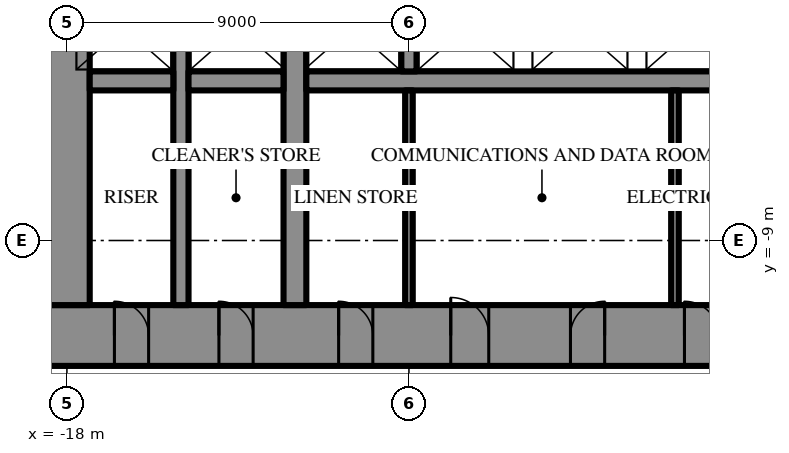
"""IFC4 building model, lengths in metres.
Left out: names, types, materials, properties, quantities, classifications, styles, units other than length and angle.
Written with IfcOpenShell. Run it as: python <this file> out.ifc"""

import sys

from ifc_helpers import new_model, si_unit, direction, frame, frame_2d, origin, place, context, subcontext, project, spatial, rectangle, extrude, element, fill, save


model = new_model("IFC4")
c1 = context("Model", 3, precision=1e-05, world=origin(), true_north=direction((0.0, 1.0)))
c2 = subcontext(c1, "Body", "Model", "MODEL_VIEW")
j1 = project(units=[si_unit("LENGTHUNIT", "METRE"), si_unit("PLANEANGLEUNIT", "RADIAN")], contexts=[c1])
p1 = place(None, origin())
s1 = spatial("IfcSite", under=j1, at=p1, CompositionType="ELEMENT")
p2 = place(p1, origin())
s2 = spatial("IfcBuilding", under=s1, at=p2, CompositionType="ELEMENT")
p3 = place(p2, frame((0.0, 0.0, 78.1)))
s3 = spatial("IfcBuildingStorey", under=s2, at=p3, CompositionType="ELEMENT", Elevation=78.1)
p4 = place(p3, frame((18.6, -11.5, 0.0), z_axis=(0.0, 0.0, 1.0), x_axis=(-1.0, 0.0, 0.0)))
e1 = element("IfcWall", 1, at=p4, inside=s3, PredefinedType="SHEAR", context=c2, shape_type="SweptSolid", body=[
    extrude(rectangle(XDim=37.2, YDim=1.6, at=frame_2d((18.6, 0.0))), origin(), (0.0, 0.0, 1.0), 4.2),
])
p5 = place(p4, frame((19.45, 0.0, 0.0)))
e2 = element("IfcOpeningElement", 2, at=p5, cuts=e1, PredefinedType="OPENING", context=c2, shape_type="SweptSolid", body=[
    extrude(rectangle(XDim=0.9, YDim=2.2, at=frame_2d((0.45, 1.1))), frame((0.0, 0.81, 0.0), z_axis=(0.0, -1.0, 0.0), x_axis=(1.0, 0.0, 0.0)), (0.0, 0.0, 1.0), 1.62),
])
p6 = place(p4, frame((22.45, 0.0, 0.0)))
e3 = element("IfcOpeningElement", 3, at=p6, cuts=e1, PredefinedType="OPENING", context=c2, shape_type="SweptSolid", body=[
    extrude(rectangle(XDim=0.9, YDim=2.2, at=frame_2d((0.45, 1.1))), frame((0.0, 0.81, 0.0), z_axis=(0.0, -1.0, 0.0), x_axis=(1.0, 0.0, 0.0)), (0.0, 0.0, 1.0), 1.62),
])
p7 = place(p4, frame((25.5, 0.0, 0.0)))
e4 = element("IfcOpeningElement", 4, at=p7, cuts=e1, PredefinedType="OPENING", context=c2, shape_type="SweptSolid", body=[
    extrude(rectangle(XDim=1.0, YDim=2.2, at=frame_2d((0.5, 1.1))), frame((0.0, 0.81, 0.0), z_axis=(0.0, -1.0, 0.0), x_axis=(1.0, 0.0, 0.0)), (0.0, 0.0, 1.0), 1.62),
])
p8 = place(p4, frame((1.85, 0.0, 0.0)))
e5 = element("IfcOpeningElement", 5, at=p8, cuts=e1, PredefinedType="OPENING", context=c2, shape_type="SweptSolid", body=[
    extrude(rectangle(XDim=0.9, YDim=2.2, at=frame_2d((0.45, 1.1))), frame((0.0, 0.81, 0.0), z_axis=(0.0, -1.0, 0.0), x_axis=(1.0, 0.0, 0.0)), (0.0, 0.0, 1.0), 1.62),
])
p9 = place(p4, frame((4.6, 0.0, 0.0)))
e6 = element("IfcOpeningElement", 6, at=p9, cuts=e1, PredefinedType="OPENING", context=c2, shape_type="SweptSolid", body=[
    extrude(rectangle(XDim=0.9, YDim=2.2, at=frame_2d((0.45, 1.1))), frame((0.0, 0.81, 0.0), z_axis=(0.0, -1.0, 0.0), x_axis=(1.0, 0.0, 0.0)), (0.0, 0.0, 1.0), 1.62),
])
p10 = place(p4, frame((7.75, 0.0, 0.0)))
e7 = element("IfcOpeningElement", 7, at=p10, cuts=e1, PredefinedType="OPENING", context=c2, shape_type="SweptSolid", body=[
    extrude(rectangle(XDim=0.9, YDim=2.2, at=frame_2d((0.45, 1.1))), frame((0.0, 0.81, 0.0), z_axis=(0.0, -1.0, 0.0), x_axis=(1.0, 0.0, 0.0)), (0.0, 0.0, 1.0), 1.62),
])
p11 = place(p4, frame((28.55, 0.0, 0.0)))
e8 = element("IfcOpeningElement", 8, at=p11, cuts=e1, PredefinedType="OPENING", context=c2, shape_type="SweptSolid", body=[
    extrude(rectangle(XDim=0.9, YDim=2.2, at=frame_2d((0.45, 1.1))), frame((0.0, 0.81, 0.0), z_axis=(0.0, -1.0, 0.0), x_axis=(1.0, 0.0, 0.0)), (0.0, 0.0, 1.0), 1.62),
])
p12 = place(p4, frame((31.7, 0.0, 0.0)))
e9 = element("IfcOpeningElement", 9, at=p12, cuts=e1, PredefinedType="OPENING", context=c2, shape_type="SweptSolid", body=[
    extrude(rectangle(XDim=0.9, YDim=2.2, at=frame_2d((0.45, 1.1))), frame((0.0, 0.81, 0.0), z_axis=(0.0, -1.0, 0.0), x_axis=(1.0, 0.0, 0.0)), (0.0, 0.0, 1.0), 1.62),
])
p13 = place(p4, frame((34.45, 0.0, 0.0)))
e10 = element("IfcOpeningElement", 10, at=p13, cuts=e1, PredefinedType="OPENING", context=c2, shape_type="SweptSolid", body=[
    extrude(rectangle(XDim=0.9, YDim=2.2, at=frame_2d((0.45, 1.1))), frame((0.0, 0.81, 0.0), z_axis=(0.0, -1.0, 0.0), x_axis=(1.0, 0.0, 0.0)), (0.0, 0.0, 1.0), 1.62),
])
p14 = place(p3, frame((-18.0, 10.7, 0.0), z_axis=(0.0, 0.0, 1.0), x_axis=(0.0, -1.0, 0.0)))
e11 = element("IfcWall", 11, at=p14, inside=s3, PredefinedType="SHEAR", context=c2, shape_type="SweptSolid", body=[
    extrude(rectangle(XDim=21.4, YDim=1.2, at=frame_2d((10.7, 0.0))), origin(), (0.0, 0.0, 1.0), 4.2),
])
p15 = place(p14, frame((9.8, 0.0, 0.0)))
e12 = element("IfcOpeningElement", 12, at=p15, cuts=e11, PredefinedType="OPENING", context=c2, shape_type="SweptSolid", body=[
    extrude(rectangle(XDim=1.8, YDim=2.4, at=frame_2d((0.9, 1.2))), frame((0.0, 0.61, 0.0), z_axis=(0.0, -1.0, 0.0), x_axis=(1.0, 0.0, 0.0)), (0.0, 0.0, 1.0), 1.22),
])
p16 = place(p3, frame((-12.0, -10.7, 0.0), z_axis=(0.0, 0.0, 1.0), x_axis=(0.0, 1.0, 0.0)))
e13 = element("IfcWall", 13, at=p16, inside=s3, PredefinedType="SHEAR", context=c2, shape_type="SweptSolid", body=[
    extrude(rectangle(XDim=21.4, YDim=0.6, at=frame_2d((10.7, 0.0))), origin(), (0.0, 0.0, 1.0), 4.2),
])
p17 = place(p16, frame((9.8, 0.0, 0.0)))
e14 = element("IfcOpeningElement", 14, at=p17, cuts=e13, PredefinedType="OPENING", context=c2, shape_type="SweptSolid", body=[
    extrude(rectangle(XDim=1.8, YDim=2.4, at=frame_2d((0.9, 1.2))), frame((0.0, 0.31, 0.0), z_axis=(0.0, -1.0, 0.0), x_axis=(1.0, 0.0, 0.0)), (0.0, 0.0, 1.0), 0.62),
])
p18 = place(p3, frame((-15.0, -10.7, 0.0), z_axis=(0.0, 0.0, 1.0), x_axis=(0.0, 1.0, 0.0)))
e15 = element("IfcWall", 15, at=p18, inside=s3, PredefinedType="SHEAR", context=c2, shape_type="SweptSolid", body=[
    extrude(rectangle(XDim=21.4, YDim=0.4, at=frame_2d((10.7, 0.0))), origin(), (0.0, 0.0, 1.0), 4.2),
])
p19 = place(p18, frame((9.8, 0.0, 0.0)))
e16 = element("IfcOpeningElement", 16, at=p19, cuts=e15, PredefinedType="OPENING", context=c2, shape_type="SweptSolid", body=[
    extrude(rectangle(XDim=1.8, YDim=2.4, at=frame_2d((0.9, 1.2))), frame((0.0, 0.21, 0.0), z_axis=(0.0, -1.0, 0.0), x_axis=(1.0, 0.0, 0.0)), (0.0, 0.0, 1.0), 0.42),
])
p20 = place(p3, frame((11.7, -4.8, 0.0), z_axis=(0.0, 0.0, 1.0), x_axis=(-1.0, 0.0, 0.0)))
e17 = element("IfcWall", 17, at=p20, inside=s3, PredefinedType="SHEAR", context=c2, shape_type="SweptSolid", body=[
    extrude(rectangle(XDim=23.4, YDim=0.5, at=frame_2d((11.7, 0.0))), origin(), (0.0, 0.0, 1.0), 4.2),
])
p21 = place(p20, frame((6.6, 0.0, 0.0)))
e18 = element("IfcOpeningElement", 18, at=p21, cuts=e17, PredefinedType="OPENING", context=c2, shape_type="SweptSolid", body=[
    extrude(rectangle(XDim=1.2, YDim=2.2, at=frame_2d((0.6, 1.1))), frame((0.0, 0.26, 0.0), z_axis=(0.0, -1.0, 0.0), x_axis=(1.0, 0.0, 0.0)), (0.0, 0.0, 1.0), 0.52),
])
p22 = place(p20, frame((3.6, 0.0, 0.0)))
e19 = element("IfcOpeningElement", 19, at=p22, cuts=e17, PredefinedType="OPENING", context=c2, shape_type="SweptSolid", body=[
    extrude(rectangle(XDim=1.2, YDim=2.2, at=frame_2d((0.6, 1.1))), frame((0.0, 0.26, 0.0), z_axis=(0.0, -1.0, 0.0), x_axis=(1.0, 0.0, 0.0)), (0.0, 0.0, 1.0), 0.52),
])
p23 = place(p3, frame((-12.3, -4.8, 0.0), z_axis=(0.0, 0.0, 1.0), x_axis=(-1.0, 0.0, 0.0)))
e20 = element("IfcWall", 20, at=p23, inside=s3, PredefinedType="SHEAR", context=c2, shape_type="SweptSolid", body=[
    extrude(rectangle(XDim=2.5, YDim=0.5, at=frame_2d((1.25, 0.0))), origin(), (0.0, 0.0, 1.0), 4.2),
])
p24 = place(p3, frame((-15.2, -4.8, 0.0), z_axis=(0.0, 0.0, 1.0), x_axis=(-1.0, 0.0, 0.0)))
e21 = element("IfcWall", 21, at=p24, inside=s3, PredefinedType="SHEAR", context=c2, shape_type="SweptSolid", body=[
    extrude(rectangle(XDim=2.2, YDim=0.5, at=frame_2d((1.1, 0.0))), origin(), (0.0, 0.0, 1.0), 4.2),
])
p25 = place(p3, frame((-9.0, -2.25, 0.0), z_axis=(0.0, 0.0, 1.0), x_axis=(0.0, -1.0, 0.0)))
e22 = element("IfcWall", 22, at=p25, inside=s3, PredefinedType="SHEAR", context=c2, shape_type="SweptSolid", body=[
    extrude(rectangle(XDim=2.3, YDim=0.4, at=frame_2d((1.15, 0.0))), origin(), (0.0, 0.0, 1.0), 4.2),
])
for number, where, z_axis, x_axis in (
    (23, (-9.0, -5.05, 0.0), (0.0, 0.0, 1.0), (0.0, -1.0, 0.0)),
    (24, (-2.0, -5.05, 0.0), (0.0, 0.0, 1.0), (0.0, -1.0, 0.0)),
):
    element("IfcWall", number, at=place(p3, frame(where, z_axis=z_axis, x_axis=x_axis)), inside=s3, PredefinedType="PARTITIONING", context=c2, shape_type="SweptSolid", body=[
        extrude(rectangle(XDim=5.65, YDim=0.2, at=frame_2d((2.825, 0.0))), origin(), (0.0, 0.0, 1.0), 4.0),
    ])
p26 = place(p5, frame((0.9, 0.0, 0.0), z_axis=(0.0, 0.0, 1.0), x_axis=(-1.0, 0.0, 0.0)))
e25 = element("IfcDoor", 25, at=p26, inside=s3, OperationType="SINGLE_SWING_RIGHT", PredefinedType="DOOR", context=c2, shape_type="SweptSolid", body=[
    extrude(rectangle(XDim=0.9, YDim=2.2, at=frame_2d((0.45, 1.1))), frame((0.0, 0.025, 0.0), z_axis=(0.0, -1.0, 0.0), x_axis=(1.0, 0.0, 0.0)), (0.0, 0.0, 1.0), 0.05),
])
fill(e2, e25)
p27 = place(p6, frame((0.9, 0.0, 0.0), z_axis=(0.0, 0.0, 1.0), x_axis=(-1.0, 0.0, 0.0)))
e26 = element("IfcDoor", 26, at=p27, inside=s3, OperationType="SINGLE_SWING_LEFT", PredefinedType="DOOR", context=c2, shape_type="SweptSolid", body=[
    extrude(rectangle(XDim=0.9, YDim=2.2, at=frame_2d((0.45, 1.1))), frame((0.0, 0.025, 0.0), z_axis=(0.0, -1.0, 0.0), x_axis=(1.0, 0.0, 0.0)), (0.0, 0.0, 1.0), 0.05),
])
fill(e3, e26)
p28 = place(p7, frame((1.0, 0.0, 0.0), z_axis=(0.0, 0.0, 1.0), x_axis=(-1.0, 0.0, 0.0)))
e27 = element("IfcDoor", 27, at=p28, inside=s3, OperationType="SINGLE_SWING_RIGHT", PredefinedType="DOOR", context=c2, shape_type="SweptSolid", body=[
    extrude(rectangle(XDim=1.0, YDim=2.2, at=frame_2d((0.5, 1.1))), frame((0.0, 0.025, 0.0), z_axis=(0.0, -1.0, 0.0), x_axis=(1.0, 0.0, 0.0)), (0.0, 0.0, 1.0), 0.05),
])
fill(e4, e27)
p29 = place(p11, frame((0.9, 0.0, 0.0), z_axis=(0.0, 0.0, 1.0), x_axis=(-1.0, 0.0, 0.0)))
e28 = element("IfcDoor", 28, at=p29, inside=s3, OperationType="SINGLE_SWING_RIGHT", PredefinedType="DOOR", context=c2, shape_type="SweptSolid", body=[
    extrude(rectangle(XDim=0.9, YDim=2.2, at=frame_2d((0.45, 1.1))), frame((0.0, 0.025, 0.0), z_axis=(0.0, -1.0, 0.0), x_axis=(1.0, 0.0, 0.0)), (0.0, 0.0, 1.0), 0.05),
])
fill(e8, e28)
p30 = place(p12, frame((0.9, 0.0, 0.0), z_axis=(0.0, 0.0, 1.0), x_axis=(-1.0, 0.0, 0.0)))
e29 = element("IfcDoor", 29, at=p30, inside=s3, OperationType="SINGLE_SWING_RIGHT", PredefinedType="DOOR", context=c2, shape_type="SweptSolid", body=[
    extrude(rectangle(XDim=0.9, YDim=2.2, at=frame_2d((0.45, 1.1))), frame((0.0, 0.025, 0.0), z_axis=(0.0, -1.0, 0.0), x_axis=(1.0, 0.0, 0.0)), (0.0, 0.0, 1.0), 0.05),
])
fill(e9, e29)
p31 = place(p13, frame((0.9, 0.0, 0.0), z_axis=(0.0, 0.0, 1.0), x_axis=(-1.0, 0.0, 0.0)))
e30 = element("IfcDoor", 30, at=p31, inside=s3, OperationType="SINGLE_SWING_RIGHT", PredefinedType="DOOR", context=c2, shape_type="SweptSolid", body=[
    extrude(rectangle(XDim=0.9, YDim=2.2, at=frame_2d((0.45, 1.1))), frame((0.0, 0.025, 0.0), z_axis=(0.0, -1.0, 0.0), x_axis=(1.0, 0.0, 0.0)), (0.0, 0.0, 1.0), 0.05),
])
fill(e10, e30)
save(model, sys.argv[1])
